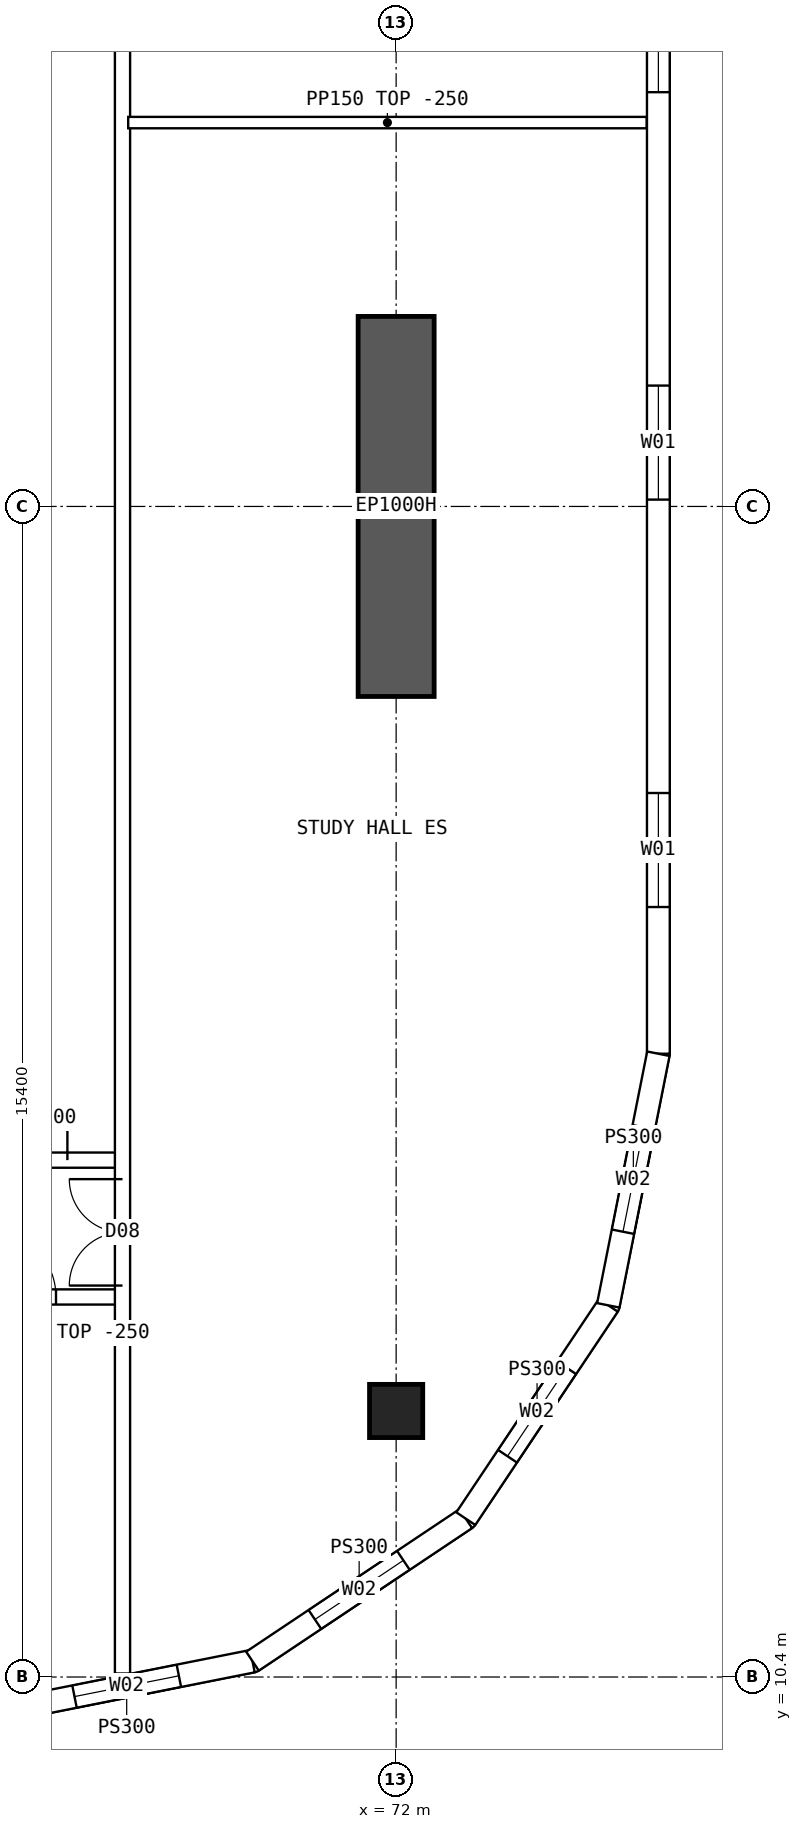
"""IFC4 building model, lengths in metres.
Left out: names, types, materials, properties, quantities, classifications, styles, units other than length and angle.
Written with IfcOpenShell. Run it as: python <this file> out.ifc"""

import sys

from ifc_helpers import new_model, si_unit, direction, frame, frame_2d, origin, origin_2d, place, context, subcontext, project, spatial, polyline, rectangle, hollow_rectangle, outline, extrude, element, fill, save


model = new_model("IFC4")
c1 = context("Model", 3, precision=1e-05, world=origin(), true_north=direction((0.0, 1.0)))
c2 = subcontext(c1, "Body", "Model", "MODEL_VIEW")
j1 = project(units=[si_unit("LENGTHUNIT", "METRE"), si_unit("PLANEANGLEUNIT", "RADIAN")], contexts=[c1])
p1 = place(None, origin())
s1 = spatial("IfcSite", under=j1, at=p1, CompositionType="ELEMENT")
p2 = place(p1, origin())
s2 = spatial("IfcBuilding", under=s1, at=p2, CompositionType="ELEMENT")
p3 = place(p2, frame((0.0, 0.0, 186.1)))
s3 = spatial("IfcBuildingStorey", under=s2, at=p3, CompositionType="ELEMENT", Elevation=186.1)
p4 = place(p3, frame((72.0, 13.9, 0.0), z_axis=(0.0, 0.0, 1.0), x_axis=(1.0, 0.0, 0.0)))
e1 = element("IfcColumn", 1, at=p4, inside=s3, PredefinedType="COLUMN", context=c2, shape_type="SweptSolid", body=[
    extrude(hollow_rectangle(XDim=0.7, YDim=0.7, WallThickness=0.07, at=origin_2d()), origin(), (0.0, 0.0, 1.0), 3.75),
])
p5 = place(p3, frame((72.0, 23.3, 0.0), z_axis=(0.0, 0.0, 1.0), x_axis=(0.0, 1.0, 0.0)))
e2 = element("IfcWall", 2, at=p5, inside=s3, PredefinedType="SHEAR", context=c2, shape_type="SweptSolid", body=[
    extrude(rectangle(XDim=5.0, YDim=1.0, at=frame_2d((2.5, 0.0))), origin(), (0.0, 0.0, 1.0), 3.75),
])
p6 = place(p3, frame((75.45, 18.6, 0.0), z_axis=(0.0, 0.0, 1.0), x_axis=(0.0, 1.0, 0.0)))
e3 = element("IfcWall", 3, at=p6, inside=s3, PredefinedType="SOLIDWALL", context=c2, shape_type="SweptSolid", body=[
    extrude(outline(polyline([(-0.015, -0.15), (26.815, -0.15), (26.785, 0.15), (0.015, 0.15), (-0.015, -0.15)])), origin(), (0.0, 0.0, 1.0), 3.5),
])
p7 = place(p6, frame((1.93, 0.0, 0.9)))
e4 = element("IfcOpeningElement", 4, at=p7, cuts=e3, PredefinedType="OPENING", context=c2, shape_type="SweptSolid", body=[
    extrude(rectangle(XDim=1.5, YDim=2.0, at=frame_2d((0.75, 1.0))), frame((0.0, 0.16, 0.0), z_axis=(0.0, -1.0, 0.0), x_axis=(1.0, 0.0, 0.0)), (0.0, 0.0, 1.0), 0.32),
])
p8 = place(p6, frame((7.29, 0.0, 0.9)))
e5 = element("IfcOpeningElement", 5, at=p8, cuts=e3, PredefinedType="OPENING", context=c2, shape_type="SweptSolid", body=[
    extrude(rectangle(XDim=1.5, YDim=2.0, at=frame_2d((0.75, 1.0))), frame((0.0, 0.16, 0.0), z_axis=(0.0, -1.0, 0.0), x_axis=(1.0, 0.0, 0.0)), (0.0, 0.0, 1.0), 0.32),
])
p9 = place(p6, frame((12.65, 0.0, 0.9)))
e6 = element("IfcOpeningElement", 6, at=p9, cuts=e3, PredefinedType="OPENING", context=c2, shape_type="SweptSolid", body=[
    extrude(rectangle(XDim=1.5, YDim=2.0, at=frame_2d((0.75, 1.0))), frame((0.0, 0.16, 0.0), z_axis=(0.0, -1.0, 0.0), x_axis=(1.0, 0.0, 0.0)), (0.0, 0.0, 1.0), 0.32),
])
p10 = place(p6, frame((18.01, 0.0, 0.9)))
e7 = element("IfcOpeningElement", 7, at=p10, cuts=e3, PredefinedType="OPENING", context=c2, shape_type="SweptSolid", body=[
    extrude(rectangle(XDim=1.5, YDim=2.0, at=frame_2d((0.75, 1.0))), frame((0.0, 0.16, 0.0), z_axis=(0.0, -1.0, 0.0), x_axis=(1.0, 0.0, 0.0)), (0.0, 0.0, 1.0), 0.32),
])
p11 = place(p6, frame((23.37, 0.0, 0.9)))
e8 = element("IfcOpeningElement", 8, at=p11, cuts=e3, PredefinedType="OPENING", context=c2, shape_type="SweptSolid", body=[
    extrude(rectangle(XDim=1.5, YDim=2.0, at=frame_2d((0.75, 1.0))), frame((0.0, 0.16, 0.0), z_axis=(0.0, -1.0, 0.0), x_axis=(1.0, 0.0, 0.0)), (0.0, 0.0, 1.0), 0.32),
])
p12 = place(p3, frame((66.8, 9.95, 0.0), z_axis=(0.0, 0.0, 1.0), x_axis=(0.98078325777, 0.195100490205, 0.0)))
e9 = element("IfcWall", 9, at=p12, inside=s3, PredefinedType="SOLIDWALL", context=c2, shape_type="SweptSolid", body=[
    extrude(outline(polyline([(-0.03, -0.15), (3.405, -0.15), (3.345, 0.15), (0.03, 0.15), (-0.03, -0.15)])), origin(), (0.0, 0.0, 1.0), 3.5),
])
p13 = place(p12, frame((0.988, 0.0, 0.9)))
e10 = element("IfcOpeningElement", 10, at=p13, cuts=e9, PredefinedType="OPENING", context=c2, shape_type="SweptSolid", body=[
    extrude(rectangle(XDim=1.4, YDim=1.8, at=frame_2d((0.7, 0.9))), frame((0.0, 0.16, 0.0), z_axis=(0.0, -1.0, 0.0), x_axis=(1.0, 0.0, 0.0)), (0.0, 0.0, 1.0), 0.32),
])
p14 = place(p3, frame((70.11, 10.608, 0.0), z_axis=(0.0, 0.0, 1.0), x_axis=(0.831493450887, 0.555534554399, 0.0)))
e11 = element("IfcWall", 11, at=p14, inside=s3, PredefinedType="SOLIDWALL", context=c2, shape_type="SweptSolid", body=[
    extrude(outline(polyline([(-0.03, -0.15), (3.405, -0.15), (3.345, 0.15), (0.03, 0.15), (-0.03, -0.15)])), origin(), (0.0, 0.0, 1.0), 3.5),
])
p15 = place(p14, frame((0.988, 0.0, 0.9)))
e12 = element("IfcOpeningElement", 12, at=p15, cuts=e11, PredefinedType="OPENING", context=c2, shape_type="SweptSolid", body=[
    extrude(rectangle(XDim=1.4, YDim=1.8, at=frame_2d((0.7, 0.9))), frame((0.0, 0.16, 0.0), z_axis=(0.0, -1.0, 0.0), x_axis=(1.0, 0.0, 0.0)), (0.0, 0.0, 1.0), 0.32),
])
p16 = place(p3, frame((72.917, 12.483, 0.0), z_axis=(0.0, 0.0, 1.0), x_axis=(0.555534554399, 0.831493450887, 0.0)))
e13 = element("IfcWall", 13, at=p16, inside=s3, PredefinedType="SOLIDWALL", context=c2, shape_type="SweptSolid", body=[
    extrude(outline(polyline([(-0.03, -0.15), (3.405, -0.15), (3.345, 0.15), (0.03, 0.15), (-0.03, -0.15)])), origin(), (0.0, 0.0, 1.0), 3.5),
])
p17 = place(p16, frame((0.988, 0.0, 0.9)))
e14 = element("IfcOpeningElement", 14, at=p17, cuts=e13, PredefinedType="OPENING", context=c2, shape_type="SweptSolid", body=[
    extrude(rectangle(XDim=1.4, YDim=1.8, at=frame_2d((0.7, 0.9))), frame((0.0, 0.16, 0.0), z_axis=(0.0, -1.0, 0.0), x_axis=(1.0, 0.0, 0.0)), (0.0, 0.0, 1.0), 0.32),
])
p18 = place(p3, frame((74.792, 15.29, 0.0), z_axis=(0.0, 0.0, 1.0), x_axis=(0.19508664885, 0.980786011034, 0.0)))
e15 = element("IfcWall", 15, at=p18, inside=s3, PredefinedType="SOLIDWALL", context=c2, shape_type="SweptSolid", body=[
    extrude(outline(polyline([(-0.03, -0.15), (3.39, -0.15), (3.36, 0.15), (0.03, 0.15), (-0.03, -0.15)])), origin(), (0.0, 0.0, 1.0), 3.5),
])
p19 = place(p18, frame((0.988, 0.0, 0.9)))
e16 = element("IfcOpeningElement", 16, at=p19, cuts=e15, PredefinedType="OPENING", context=c2, shape_type="SweptSolid", body=[
    extrude(rectangle(XDim=1.4, YDim=1.8, at=frame_2d((0.7, 0.9))), frame((0.0, 0.16, 0.0), z_axis=(0.0, -1.0, 0.0), x_axis=(1.0, 0.0, 0.0)), (0.0, 0.0, 1.0), 0.32),
])
p20 = place(p3, frame((66.425, 15.4, 0.0), z_axis=(0.0, 0.0, 1.0), x_axis=(1.0, 0.0, 0.0)))
e17 = element("IfcWall", 17, at=p20, inside=s3, PredefinedType="SOLIDWALL", context=c2, shape_type="SweptSolid", body=[
    extrude(rectangle(XDim=1.975, YDim=0.2, at=frame_2d((0.987, 0.0))), origin(), (0.0, 0.0, 1.0), 3.5),
])
p21 = place(p20, frame((0.2, 0.0, 0.0)))
e18 = element("IfcOpeningElement", 18, at=p21, cuts=e17, PredefinedType="OPENING", context=c2, shape_type="SweptSolid", body=[
    extrude(rectangle(XDim=0.9, YDim=2.1, at=frame_2d((0.45, 1.05))), frame((0.0, 0.11, 0.0), z_axis=(0.0, -1.0, 0.0), x_axis=(1.0, 0.0, 0.0)), (0.0, 0.0, 1.0), 0.22),
])
p22 = place(p3, frame((66.425, 17.2, 0.0), z_axis=(0.0, 0.0, 1.0), x_axis=(1.0, 0.0, 0.0)))
e19 = element("IfcWall", 19, at=p22, inside=s3, PredefinedType="SOLIDWALL", context=c2, shape_type="SweptSolid", body=[
    extrude(rectangle(XDim=1.975, YDim=0.2, at=frame_2d((0.987, 0.0))), origin(), (0.0, 0.0, 1.0), 3.5),
])
p23 = place(p22, frame((0.05, 0.0, 0.0)))
e20 = element("IfcOpeningElement", 20, at=p23, cuts=e19, PredefinedType="OPENING", context=c2, shape_type="SweptSolid", body=[
    extrude(rectangle(XDim=1.2, YDim=2.1, at=frame_2d((0.6, 1.05))), frame((0.0, 0.11, 0.0), z_axis=(0.0, -1.0, 0.0), x_axis=(1.0, 0.0, 0.0)), (0.0, 0.0, 1.0), 0.22),
])
p24 = place(p3, frame((68.475, 30.85, 0.0), z_axis=(0.0, 0.0, 1.0), x_axis=(1.0, 0.0, 0.0)))
e21 = element("IfcWall", 21, at=p24, inside=s3, PredefinedType="PARTITIONING", context=c2, shape_type="SweptSolid", body=[
    extrude(outline(polyline([(0.0, 0.0), (6.82, 0.0), (6.82, 3.5), (3.827, 3.5), (3.825, 3.05), (3.227, 3.05), (3.225, 3.5), (0.0, 3.5), (0.0, 0.0)])), frame((0.0, 0.075, 0.0), z_axis=(0.0, -1.0, 0.0), x_axis=(1.0, 0.0, 0.0)), (0.0, 0.0, 1.0), 0.15),
])
p25 = place(p3, frame((68.4, 10.446, 0.0), z_axis=(0.0, 0.0, 1.0), x_axis=(0.0, 1.0, 0.0)))
e22 = element("IfcWall", 22, at=p25, inside=s3, PredefinedType="SOLIDWALL", context=c2, shape_type="SweptSolid", body=[
    extrude(rectangle(XDim=43.107, YDim=0.2, at=frame_2d((21.554, 0.0))), origin(), (0.0, 0.0, 1.0), 3.5),
])
p26 = place(p25, frame((5.104, 0.0, 0.0)))
e23 = element("IfcOpeningElement", 23, at=p26, cuts=e22, PredefinedType="OPENING", context=c2, shape_type="SweptSolid", body=[
    extrude(rectangle(XDim=1.4, YDim=2.1, at=frame_2d((0.7, 1.05))), frame((0.0, 0.11, 0.0), z_axis=(0.0, -1.0, 0.0), x_axis=(1.0, 0.0, 0.0)), (0.0, 0.0, 1.0), 0.22),
])
p27 = place(p25, frame((36.504, 0.0, 0.0)))
e24 = element("IfcOpeningElement", 24, at=p27, cuts=e22, PredefinedType="OPENING", context=c2, shape_type="SweptSolid", body=[
    extrude(rectangle(XDim=1.4, YDim=2.1, at=frame_2d((0.7, 1.05))), frame((0.0, 0.11, 0.0), z_axis=(0.0, -1.0, 0.0), x_axis=(1.0, 0.0, 0.0)), (0.0, 0.0, 1.0), 0.22),
])
p28 = place(p7, origin())
e25 = element("IfcWindow", 25, at=p28, inside=s3, PartitioningType="SINGLE_PANEL", PredefinedType="WINDOW", context=c2, shape_type="SweptSolid", body=[
    extrude(rectangle(XDim=1.5, YDim=2.0, at=frame_2d((0.75, 1.0))), frame((0.0, 0.03, 0.0), z_axis=(0.0, -1.0, 0.0), x_axis=(1.0, 0.0, 0.0)), (0.0, 0.0, 1.0), 0.06),
])
fill(e4, e25)
p29 = place(p8, origin())
e26 = element("IfcWindow", 26, at=p29, inside=s3, PartitioningType="SINGLE_PANEL", PredefinedType="WINDOW", context=c2, shape_type="SweptSolid", body=[
    extrude(rectangle(XDim=1.5, YDim=2.0, at=frame_2d((0.75, 1.0))), frame((0.0, 0.03, 0.0), z_axis=(0.0, -1.0, 0.0), x_axis=(1.0, 0.0, 0.0)), (0.0, 0.0, 1.0), 0.06),
])
fill(e5, e26)
p30 = place(p9, origin())
e27 = element("IfcWindow", 27, at=p30, inside=s3, PartitioningType="SINGLE_PANEL", PredefinedType="WINDOW", context=c2, shape_type="SweptSolid", body=[
    extrude(rectangle(XDim=1.5, YDim=2.0, at=frame_2d((0.75, 1.0))), frame((0.0, 0.03, 0.0), z_axis=(0.0, -1.0, 0.0), x_axis=(1.0, 0.0, 0.0)), (0.0, 0.0, 1.0), 0.06),
])
fill(e6, e27)
p31 = place(p13, origin())
e28 = element("IfcWindow", 28, at=p31, inside=s3, PartitioningType="SINGLE_PANEL", PredefinedType="WINDOW", context=c2, shape_type="SweptSolid", body=[
    extrude(rectangle(XDim=1.4, YDim=1.8, at=frame_2d((0.7, 0.9))), frame((0.0, 0.03, 0.0), z_axis=(0.0, -1.0, 0.0), x_axis=(1.0, 0.0, 0.0)), (0.0, 0.0, 1.0), 0.06),
])
fill(e10, e28)
p32 = place(p15, origin())
e29 = element("IfcWindow", 29, at=p32, inside=s3, PartitioningType="SINGLE_PANEL", PredefinedType="WINDOW", context=c2, shape_type="SweptSolid", body=[
    extrude(rectangle(XDim=1.4, YDim=1.8, at=frame_2d((0.7, 0.9))), frame((0.0, 0.03, 0.0), z_axis=(0.0, -1.0, 0.0), x_axis=(1.0, 0.0, 0.0)), (0.0, 0.0, 1.0), 0.06),
])
fill(e12, e29)
p33 = place(p17, origin())
e30 = element("IfcWindow", 30, at=p33, inside=s3, PartitioningType="SINGLE_PANEL", PredefinedType="WINDOW", context=c2, shape_type="SweptSolid", body=[
    extrude(rectangle(XDim=1.4, YDim=1.8, at=frame_2d((0.7, 0.9))), frame((0.0, 0.03, 0.0), z_axis=(0.0, -1.0, 0.0), x_axis=(1.0, 0.0, 0.0)), (0.0, 0.0, 1.0), 0.06),
])
fill(e14, e30)
p34 = place(p19, origin())
e31 = element("IfcWindow", 31, at=p34, inside=s3, PartitioningType="SINGLE_PANEL", PredefinedType="WINDOW", context=c2, shape_type="SweptSolid", body=[
    extrude(rectangle(XDim=1.4, YDim=1.8, at=frame_2d((0.7, 0.9))), frame((0.0, 0.03, 0.0), z_axis=(0.0, -1.0, 0.0), x_axis=(1.0, 0.0, 0.0)), (0.0, 0.0, 1.0), 0.06),
])
fill(e16, e31)
p35 = place(p23, origin())
e32 = element("IfcDoor", 32, at=p35, inside=s3, OperationType="DOUBLE_DOOR_SINGLE_SWING", PredefinedType="DOOR", context=c2, shape_type="SweptSolid", body=[
    extrude(rectangle(XDim=1.2, YDim=2.1, at=frame_2d((0.6, 1.05))), frame((0.0, 0.025, 0.0), z_axis=(0.0, -1.0, 0.0), x_axis=(1.0, 0.0, 0.0)), (0.0, 0.0, 1.0), 0.05),
])
fill(e20, e32)
p36 = place(p26, origin())
e33 = element("IfcDoor", 33, at=p36, inside=s3, OperationType="DOUBLE_DOOR_SINGLE_SWING", PredefinedType="DOOR", context=c2, shape_type="SweptSolid", body=[
    extrude(rectangle(XDim=1.4, YDim=2.1, at=frame_2d((0.7, 1.05))), frame((0.0, 0.025, 0.0), z_axis=(0.0, -1.0, 0.0), x_axis=(1.0, 0.0, 0.0)), (0.0, 0.0, 1.0), 0.05),
])
fill(e23, e33)
p37 = place(p21, origin())
e34 = element("IfcDoor", 34, at=p37, inside=s3, OperationType="SINGLE_SWING_LEFT", PredefinedType="DOOR", context=c2, shape_type="SweptSolid", body=[
    extrude(rectangle(XDim=0.9, YDim=2.1, at=frame_2d((0.45, 1.05))), frame((0.0, 0.025, 0.0), z_axis=(0.0, -1.0, 0.0), x_axis=(1.0, 0.0, 0.0)), (0.0, 0.0, 1.0), 0.05),
])
fill(e18, e34)
save(model, sys.argv[1])
